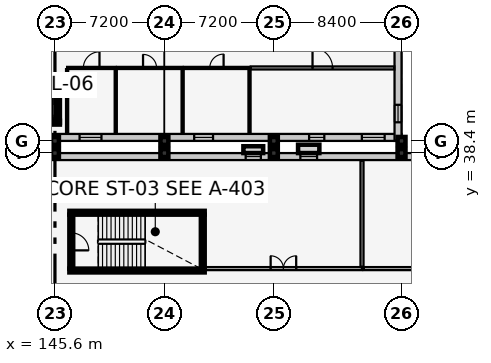
"""IFC4 building model, lengths in metres.
Left out: names, types, materials, properties, quantities, classifications, styles, units other than length and angle.
Written with IfcOpenShell. Run it as: python <this file> out.ifc"""

import sys

from ifc_helpers import new_model, si_unit, direction, frame, frame_2d, origin, origin_2d, place, context, subcontext, project, spatial, rectangle, extrude, element, fill, save


model = new_model("IFC4")
c1 = context("Model", 3, precision=1e-05, world=origin(), true_north=direction((0.0, 1.0)))
c2 = subcontext(c1, "Body", "Model", "MODEL_VIEW")
j1 = project(units=[si_unit("LENGTHUNIT", "METRE"), si_unit("PLANEANGLEUNIT", "RADIAN")], contexts=[c1])
p1 = place(None, origin())
s1 = spatial("IfcSite", under=j1, at=p1, CompositionType="ELEMENT")
p2 = place(p1, origin())
s2 = spatial("IfcBuilding", under=s1, at=p2, CompositionType="ELEMENT")
p3 = place(p2, frame((0.0, 0.0, 5.4)))
s3 = spatial("IfcBuildingStorey", under=s2, at=p3, CompositionType="ELEMENT", Elevation=5.4)
for number, where, z_axis, x_axis in (
    (1, (145.6, 38.4, 0.0), (0.0, 0.0, 1.0), (1.0, 0.0, 0.0)),
    (2, (152.8, 38.4, 0.0), (0.0, 0.0, 1.0), (1.0, 0.0, 0.0)),
    (3, (160.0, 38.4, 0.0), (0.0, 0.0, 1.0), (1.0, 0.0, 0.0)),
    (4, (168.4, 38.4, 0.0), (0.0, 0.0, 1.0), (1.0, 0.0, 0.0)),
    (5, (145.6, 39.2, 0.0), (0.0, 0.0, 1.0), (1.0, 0.0, 0.0)),
    (6, (152.8, 39.2, 0.0), (0.0, 0.0, 1.0), (1.0, 0.0, 0.0)),
    (7, (160.0, 39.2, 0.0), (0.0, 0.0, 1.0), (1.0, 0.0, 0.0)),
    (8, (168.4, 39.2, 0.0), (0.0, 0.0, 1.0), (1.0, 0.0, 0.0)),
):
    element("IfcColumn", number, at=place(p3, frame(where, z_axis=z_axis, x_axis=x_axis)), inside=s3, PredefinedType="COLUMN", context=c2, shape_type="SweptSolid", body=[
        extrude(rectangle(XDim=0.52, YDim=0.52, at=origin_2d()), origin(), (0.0, 0.0, 1.0), 4.2),
    ])
p4 = place(p3, frame((124.0, 38.17, 0.0), z_axis=(0.0, 0.0, 1.0), x_axis=(1.0, 0.0, 0.0)))
e9 = element("IfcWall", 9, at=p4, inside=s3, PredefinedType="SOLIDWALL", context=c2, shape_type="SweptSolid", body=[
    extrude(rectangle(XDim=62.0, YDim=0.46, at=frame_2d((31.0, 0.0))), origin(), (0.0, 0.0, 1.0), 3.095),
])
p5 = place(p4, frame((1.134, 0.0, 0.9)))
e10 = element("IfcOpeningElement", 10, at=p5, cuts=e9, PredefinedType="OPENING", context=c2, shape_type="SweptSolid", body=[
    extrude(rectangle(XDim=1.38, YDim=1.6, at=frame_2d((0.69, 0.8))), frame((0.0, 0.242, 0.0), z_axis=(0.0, -1.0, 0.0), x_axis=(1.0, 0.0, 0.0)), (0.0, 0.0, 1.0), 0.484),
])
p6 = place(p4, frame((4.721, 0.0, 0.9)))
e11 = element("IfcOpeningElement", 11, at=p6, cuts=e9, PredefinedType="OPENING", context=c2, shape_type="SweptSolid", body=[
    extrude(rectangle(XDim=1.5, YDim=1.6, at=frame_2d((0.75, 0.8))), frame((0.0, 0.242, 0.0), z_axis=(0.0, -1.0, 0.0), x_axis=(1.0, 0.0, 0.0)), (0.0, 0.0, 1.0), 0.484),
])
p7 = place(p4, frame((12.205, 0.0, 0.9)))
e12 = element("IfcOpeningElement", 12, at=p7, cuts=e9, PredefinedType="OPENING", context=c2, shape_type="SweptSolid", body=[
    extrude(rectangle(XDim=1.12, YDim=1.75, at=frame_2d((0.56, 0.875))), frame((0.0, 0.242, 0.0), z_axis=(0.0, -1.0, 0.0), x_axis=(1.0, 0.0, 0.0)), (0.0, 0.0, 1.0), 0.484),
])
p8 = place(p4, frame((15.792, 0.0, 0.9)))
e13 = element("IfcOpeningElement", 13, at=p8, cuts=e9, PredefinedType="OPENING", context=c2, shape_type="SweptSolid", body=[
    extrude(rectangle(XDim=1.24, YDim=1.75, at=frame_2d((0.62, 0.875))), frame((0.0, 0.242, 0.0), z_axis=(0.0, -1.0, 0.0), x_axis=(1.0, 0.0, 0.0)), (0.0, 0.0, 1.0), 0.484),
])
p9 = place(p4, frame((19.389, 0.0, 0.9)))
e14 = element("IfcOpeningElement", 14, at=p9, cuts=e9, PredefinedType="OPENING", context=c2, shape_type="SweptSolid", body=[
    extrude(rectangle(XDim=1.34, YDim=1.75, at=frame_2d((0.67, 0.875))), frame((0.0, 0.242, 0.0), z_axis=(0.0, -1.0, 0.0), x_axis=(1.0, 0.0, 0.0)), (0.0, 0.0, 1.0), 0.484),
])
p10 = place(p4, frame((34.147, 0.0, 0.9)))
e15 = element("IfcOpeningElement", 15, at=p10, cuts=e9, PredefinedType="OPENING", context=c2, shape_type="SweptSolid", body=[
    extrude(rectangle(XDim=1.0, YDim=1.35, at=frame_2d((0.5, 0.675))), frame((0.0, 0.242, 0.0), z_axis=(0.0, -1.0, 0.0), x_axis=(1.0, 0.0, 0.0)), (0.0, 0.0, 1.0), 0.484),
])
p11 = place(p4, frame((37.744, 0.0, 0.9)))
e16 = element("IfcOpeningElement", 16, at=p11, cuts=e9, PredefinedType="OPENING", context=c2, shape_type="SweptSolid", body=[
    extrude(rectangle(XDim=1.1, YDim=1.35, at=frame_2d((0.55, 0.675))), frame((0.0, 0.242, 0.0), z_axis=(0.0, -1.0, 0.0), x_axis=(1.0, 0.0, 0.0)), (0.0, 0.0, 1.0), 0.484),
])
p12 = place(p4, frame((48.535, 0.0, 0.9)))
e17 = element("IfcOpeningElement", 17, at=p12, cuts=e9, PredefinedType="OPENING", context=c2, shape_type="SweptSolid", body=[
    extrude(rectangle(XDim=1.4, YDim=1.35, at=frame_2d((0.7, 0.675))), frame((0.0, 0.242, 0.0), z_axis=(0.0, -1.0, 0.0), x_axis=(1.0, 0.0, 0.0)), (0.0, 0.0, 1.0), 0.484),
])
p13 = place(p4, frame((59.602, 0.0, 0.9)))
e18 = element("IfcOpeningElement", 18, at=p13, cuts=e9, PredefinedType="OPENING", context=c2, shape_type="SweptSolid", body=[
    extrude(rectangle(XDim=1.15, YDim=1.45, at=frame_2d((0.575, 0.725))), frame((0.0, 0.242, 0.0), z_axis=(0.0, -1.0, 0.0), x_axis=(1.0, 0.0, 0.0)), (0.0, 0.0, 1.0), 0.484),
])
p14 = place(p3, frame((168.4, 39.43, 0.0), z_axis=(0.0, 0.0, 1.0), x_axis=(-1.0, 0.0, 0.0)))
e19 = element("IfcWall", 19, at=p14, inside=s3, PredefinedType="SOLIDWALL", context=c2, shape_type="SweptSolid", body=[
    extrude(rectangle(XDim=37.2, YDim=0.46, at=frame_2d((18.6, 0.0))), origin(), (0.0, 0.0, 1.0), 3.115),
])
p15 = place(p14, frame((1.11, 0.0, 0.9)))
e20 = element("IfcOpeningElement", 20, at=p15, cuts=e19, PredefinedType="OPENING", context=c2, shape_type="SweptSolid", body=[
    extrude(rectangle(XDim=1.5, YDim=1.6, at=frame_2d((0.75, 0.8))), frame((0.0, 0.242, 0.0), z_axis=(0.0, -1.0, 0.0), x_axis=(1.0, 0.0, 0.0)), (0.0, 0.0, 1.0), 0.484),
])
p16 = place(p14, frame((5.08, 0.0, 0.9)))
e21 = element("IfcOpeningElement", 21, at=p16, cuts=e19, PredefinedType="OPENING", context=c2, shape_type="SweptSolid", body=[
    extrude(rectangle(XDim=1.0, YDim=1.75, at=frame_2d((0.5, 0.875))), frame((0.0, 0.242, 0.0), z_axis=(0.0, -1.0, 0.0), x_axis=(1.0, 0.0, 0.0)), (0.0, 0.0, 1.0), 0.484),
])
p17 = place(p14, frame((12.4, 0.0, 0.9)))
e22 = element("IfcOpeningElement", 22, at=p17, cuts=e19, PredefinedType="OPENING", context=c2, shape_type="SweptSolid", body=[
    extrude(rectangle(XDim=1.24, YDim=1.75, at=frame_2d((0.62, 0.875))), frame((0.0, 0.242, 0.0), z_axis=(0.0, -1.0, 0.0), x_axis=(1.0, 0.0, 0.0)), (0.0, 0.0, 1.0), 0.484),
])
p18 = place(p14, frame((19.74, 0.0, 0.9)))
e23 = element("IfcOpeningElement", 23, at=p18, cuts=e19, PredefinedType="OPENING", context=c2, shape_type="SweptSolid", body=[
    extrude(rectangle(XDim=1.44, YDim=1.75, at=frame_2d((0.72, 0.875))), frame((0.0, 0.242, 0.0), z_axis=(0.0, -1.0, 0.0), x_axis=(1.0, 0.0, 0.0)), (0.0, 0.0, 1.0), 0.484),
])
p19 = place(p14, frame((27.45, 0.0, 0.9)))
e24 = element("IfcOpeningElement", 24, at=p19, cuts=e19, PredefinedType="OPENING", context=c2, shape_type="SweptSolid", body=[
    extrude(rectangle(XDim=0.9, YDim=1.35, at=frame_2d((0.45, 0.675))), frame((0.0, 0.242, 0.0), z_axis=(0.0, -1.0, 0.0), x_axis=(1.0, 0.0, 0.0)), (0.0, 0.0, 1.0), 0.484),
])
p20 = place(p14, frame((31.12, 0.0, 0.9)))
e25 = element("IfcOpeningElement", 25, at=p20, cuts=e19, PredefinedType="OPENING", context=c2, shape_type="SweptSolid", body=[
    extrude(rectangle(XDim=1.0, YDim=1.35, at=frame_2d((0.5, 0.675))), frame((0.0, 0.242, 0.0), z_axis=(0.0, -1.0, 0.0), x_axis=(1.0, 0.0, 0.0)), (0.0, 0.0, 1.0), 0.484),
])
p21 = place(p14, frame((34.79, 0.0, 0.9)))
e26 = element("IfcOpeningElement", 26, at=p21, cuts=e19, PredefinedType="OPENING", context=c2, shape_type="SweptSolid", body=[
    extrude(rectangle(XDim=1.1, YDim=1.35, at=frame_2d((0.55, 0.675))), frame((0.0, 0.242, 0.0), z_axis=(0.0, -1.0, 0.0), x_axis=(1.0, 0.0, 0.0)), (0.0, 0.0, 1.0), 0.484),
])
p22 = place(p3, frame((168.17, 60.8, 0.0), z_axis=(0.0, 0.0, 1.0), x_axis=(0.0, -1.0, 0.0)))
e27 = element("IfcWall", 27, at=p22, inside=s3, PredefinedType="SOLIDWALL", context=c2, shape_type="SweptSolid", body=[
    extrude(rectangle(XDim=21.6, YDim=0.46, at=frame_2d((10.8, 0.0))), origin(), (0.0, 0.0, 1.0), 3.215),
])
p23 = place(p22, frame((1.2, 0.0, 0.9)))
e28 = element("IfcOpeningElement", 28, at=p23, cuts=e27, PredefinedType="OPENING", context=c2, shape_type="SweptSolid", body=[
    extrude(rectangle(XDim=1.2, YDim=1.35, at=frame_2d((0.6, 0.675))), frame((0.0, 0.242, 0.0), z_axis=(0.0, -1.0, 0.0), x_axis=(1.0, 0.0, 0.0)), (0.0, 0.0, 1.0), 0.484),
])
p24 = place(p22, frame((4.75, 0.0, 0.9)))
e29 = element("IfcOpeningElement", 29, at=p24, cuts=e27, PredefinedType="OPENING", context=c2, shape_type="SweptSolid", body=[
    extrude(rectangle(XDim=1.3, YDim=1.35, at=frame_2d((0.65, 0.675))), frame((0.0, 0.242, 0.0), z_axis=(0.0, -1.0, 0.0), x_axis=(1.0, 0.0, 0.0)), (0.0, 0.0, 1.0), 0.484),
])
p25 = place(p22, frame((8.3, 0.0, 0.9)))
e30 = element("IfcOpeningElement", 30, at=p25, cuts=e27, PredefinedType="OPENING", context=c2, shape_type="SweptSolid", body=[
    extrude(rectangle(XDim=1.4, YDim=1.35, at=frame_2d((0.7, 0.675))), frame((0.0, 0.242, 0.0), z_axis=(0.0, -1.0, 0.0), x_axis=(1.0, 0.0, 0.0)), (0.0, 0.0, 1.0), 0.484),
])
p26 = place(p22, frame((12.125, 0.0, 0.9)))
e31 = element("IfcOpeningElement", 31, at=p26, cuts=e27, PredefinedType="OPENING", context=c2, shape_type="SweptSolid", body=[
    extrude(rectangle(XDim=0.95, YDim=1.45, at=frame_2d((0.475, 0.725))), frame((0.0, 0.242, 0.0), z_axis=(0.0, -1.0, 0.0), x_axis=(1.0, 0.0, 0.0)), (0.0, 0.0, 1.0), 0.484),
])
p27 = place(p22, frame((19.225, 0.0, 0.9)))
e32 = element("IfcOpeningElement", 32, at=p27, cuts=e27, PredefinedType="OPENING", context=c2, shape_type="SweptSolid", body=[
    extrude(rectangle(XDim=1.15, YDim=1.45, at=frame_2d((0.575, 0.725))), frame((0.0, 0.242, 0.0), z_axis=(0.0, -1.0, 0.0), x_axis=(1.0, 0.0, 0.0)), (0.0, 0.0, 1.0), 0.484),
])
for number, where, z_axis, x_axis in (
    (33, (146.55, 30.675, 0.0), (0.0, 0.0, 1.0), (1.0, 0.0, 0.0)),
    (34, (155.45, 34.475, 0.0), (0.0, 0.0, 1.0), (-1.0, 0.0, 0.0)),
):
    element("IfcWall", number, at=place(p3, frame(where, z_axis=z_axis, x_axis=x_axis)), inside=s3, PredefinedType="SHEAR", context=c2, shape_type="SweptSolid", body=[
        extrude(rectangle(XDim=8.9, YDim=0.25, at=frame_2d((4.45, 0.0))), origin(), (0.0, 0.0, 1.0), 3.94),
    ])
p28 = place(p3, frame((146.675, 34.35, 0.0), z_axis=(0.0, 0.0, 1.0), x_axis=(0.0, -1.0, 0.0)))
e35 = element("IfcWall", 35, at=p28, inside=s3, PredefinedType="SHEAR", context=c2, shape_type="SweptSolid", body=[
    extrude(rectangle(XDim=3.55, YDim=0.25, at=frame_2d((1.775, 0.0))), origin(), (0.0, 0.0, 1.0), 3.94),
])
p29 = place(p28, frame((1.2, 0.0, 0.0)))
e36 = element("IfcOpeningElement", 36, at=p29, cuts=e35, PredefinedType="OPENING", context=c2, shape_type="SweptSolid", body=[
    extrude(rectangle(XDim=1.15, YDim=2.15, at=frame_2d((0.575, 1.075))), frame((0.0, 0.137, 0.0), z_axis=(0.0, -1.0, 0.0), x_axis=(1.0, 0.0, 0.0)), (0.0, 0.0, 1.0), 0.274),
])
p30 = place(p3, frame((155.325, 30.8, 0.0), z_axis=(0.0, 0.0, 1.0), x_axis=(0.0, 1.0, 0.0)))
e37 = element("IfcWall", 37, at=p30, inside=s3, PredefinedType="SHEAR", context=c2, shape_type="SweptSolid", body=[
    extrude(rectangle(XDim=3.55, YDim=0.25, at=frame_2d((1.775, 0.0))), origin(), (0.0, 0.0, 1.0), 3.94),
])
p31 = place(p3, frame((143.875, 40.4, 0.0), z_axis=(0.0, 0.0, 1.0), x_axis=(1.0, 0.0, 0.0)))
e38 = element("IfcWall", 38, at=p31, inside=s3, PredefinedType="SHEAR", context=c2, shape_type="SweptSolid", body=[
    extrude(rectangle(XDim=2.05, YDim=0.25, at=frame_2d((1.025, 0.0))), origin(), (0.0, 0.0, 1.0), 3.96),
])
p32 = place(p3, frame((145.925, 42.4, 0.0), z_axis=(0.0, 0.0, 1.0), x_axis=(-1.0, 0.0, 0.0)))
e39 = element("IfcWall", 39, at=p32, inside=s3, PredefinedType="SHEAR", context=c2, shape_type="SweptSolid", body=[
    extrude(rectangle(XDim=2.05, YDim=0.25, at=frame_2d((1.025, 0.0))), origin(), (0.0, 0.0, 1.0), 3.96),
])
p33 = place(p32, frame((0.55, 0.0, 0.0)))
e40 = element("IfcOpeningElement", 40, at=p33, cuts=e39, PredefinedType="OPENING", context=c2, shape_type="SweptSolid", body=[
    extrude(rectangle(XDim=0.95, YDim=2.1, at=frame_2d((0.475, 1.05))), frame((0.0, 0.137, 0.0), z_axis=(0.0, -1.0, 0.0), x_axis=(1.0, 0.0, 0.0)), (0.0, 0.0, 1.0), 0.274),
])
p34 = place(p3, frame((145.8, 40.4, 0.0), z_axis=(0.0, 0.0, 1.0), x_axis=(0.0, 1.0, 0.0)))
e41 = element("IfcWall", 41, at=p34, inside=s3, PredefinedType="SHEAR", context=c2, shape_type="SweptSolid", body=[
    extrude(rectangle(XDim=2.0, YDim=0.25, at=frame_2d((1.0, 0.0))), origin(), (0.0, 0.0, 1.0), 3.96),
])
p35 = place(p3, frame((155.46, 30.8, 0.0), z_axis=(0.0, 0.0, 1.0), x_axis=(1.0, 0.0, 0.0)))
e42 = element("IfcWall", 42, at=p35, inside=s3, PredefinedType="PARTITIONING", context=c2, shape_type="SweptSolid", body=[
    extrude(rectangle(XDim=10.34, YDim=0.2, at=frame_2d((5.17, 0.0))), origin(), (0.0, 0.0, 1.0), 3.94),
])
p36 = place(p35, frame((4.33, 0.0, 0.0)))
e43 = element("IfcOpeningElement", 43, at=p36, cuts=e42, PredefinedType="OPENING", context=c2, shape_type="SweptSolid", body=[
    extrude(rectangle(XDim=1.68, YDim=2.3, at=frame_2d((0.84, 1.15))), frame((0.0, 0.112, 0.0), z_axis=(0.0, -1.0, 0.0), x_axis=(1.0, 0.0, 0.0)), (0.0, 0.0, 1.0), 0.224),
])
p37 = place(p3, frame((165.8, 30.91, 0.0), z_axis=(0.0, 0.0, 1.0), x_axis=(0.0, 1.0, 0.0)))
e44 = element("IfcWall", 44, at=p37, inside=s3, PredefinedType="PARTITIONING", context=c2, shape_type="SweptSolid", body=[
    extrude(rectangle(XDim=7.02, YDim=0.2, at=frame_2d((3.51, 0.0))), origin(), (0.0, 0.0, 1.0), 3.94),
])
p38 = place(p3, frame((165.91, 30.8, 0.0), z_axis=(0.0, 0.0, 1.0), x_axis=(1.0, 0.0, 0.0)))
e45 = element("IfcWall", 45, at=p38, inside=s3, PredefinedType="PARTITIONING", context=c2, shape_type="SweptSolid", body=[
    extrude(rectangle(XDim=10.49, YDim=0.2, at=frame_2d((5.245, 0.0))), origin(), (0.0, 0.0, 1.0), 3.94),
])
p39 = place(p38, frame((4.465, 0.0, 0.0)))
e46 = element("IfcOpeningElement", 46, at=p39, cuts=e45, PredefinedType="OPENING", context=c2, shape_type="SweptSolid", body=[
    extrude(rectangle(XDim=1.56, YDim=2.25, at=frame_2d((0.78, 1.125))), frame((0.0, 0.112, 0.0), z_axis=(0.0, -1.0, 0.0), x_axis=(1.0, 0.0, 0.0)), (0.0, 0.0, 1.0), 0.224),
])
p40 = place(p3, frame((146.4, 44.0, 0.0), z_axis=(0.0, 0.0, 1.0), x_axis=(1.0, 0.0, 0.0)))
e47 = element("IfcWall", 47, at=p40, inside=s3, PredefinedType="PARTITIONING", context=c2, shape_type="SweptSolid", body=[
    extrude(rectangle(XDim=3.2, YDim=0.14, at=frame_2d((1.6, 0.0))), origin(), (0.0, 0.0, 1.0), 3.96),
])
p41 = place(p40, frame((1.07, 0.0, 0.0)))
e48 = element("IfcOpeningElement", 48, at=p41, cuts=e47, PredefinedType="OPENING", context=c2, shape_type="SweptSolid", body=[
    extrude(rectangle(XDim=1.06, YDim=2.1, at=frame_2d((0.53, 1.05))), frame((0.0, 0.082, 0.0), z_axis=(0.0, -1.0, 0.0), x_axis=(1.0, 0.0, 0.0)), (0.0, 0.0, 1.0), 0.164),
])
for number, where, z_axis, x_axis in (
    (49, (146.4, 39.67, 0.0), (0.0, 0.0, 1.0), (0.0, 1.0, 0.0)),
    (50, (149.6, 39.67, 0.0), (0.0, 0.0, 1.0), (0.0, 1.0, 0.0)),
):
    element("IfcWall", number, at=place(p3, frame(where, z_axis=z_axis, x_axis=x_axis)), inside=s3, PredefinedType="PARTITIONING", context=c2, shape_type="SweptSolid", body=[
        extrude(rectangle(XDim=4.25, YDim=0.14, at=frame_2d((2.125, 0.0))), origin(), (0.0, 0.0, 1.0), 3.96),
    ])
p42 = place(p3, frame((149.68, 44.0, 0.0), z_axis=(0.0, 0.0, 1.0), x_axis=(1.0, 0.0, 0.0)))
e51 = element("IfcWall", 51, at=p42, inside=s3, PredefinedType="PARTITIONING", context=c2, shape_type="SweptSolid", body=[
    extrude(rectangle(XDim=4.32, YDim=0.14, at=frame_2d((2.16, 0.0))), origin(), (0.0, 0.0, 1.0), 3.96),
])
p43 = place(p42, frame((1.715, 0.0, 0.0)))
e52 = element("IfcOpeningElement", 52, at=p43, cuts=e51, PredefinedType="OPENING", context=c2, shape_type="SweptSolid", body=[
    extrude(rectangle(XDim=0.89, YDim=2.05, at=frame_2d((0.445, 1.025))), frame((0.0, 0.082, 0.0), z_axis=(0.0, -1.0, 0.0), x_axis=(1.0, 0.0, 0.0)), (0.0, 0.0, 1.0), 0.164),
])
p44 = place(p3, frame((154.0, 39.67, 0.0), z_axis=(0.0, 0.0, 1.0), x_axis=(0.0, 1.0, 0.0)))
e53 = element("IfcWall", 53, at=p44, inside=s3, PredefinedType="PARTITIONING", context=c2, shape_type="SweptSolid", body=[
    extrude(rectangle(XDim=4.25, YDim=0.14, at=frame_2d((2.125, 0.0))), origin(), (0.0, 0.0, 1.0), 3.96),
])
p45 = place(p3, frame((154.08, 44.0, 0.0), z_axis=(0.0, 0.0, 1.0), x_axis=(1.0, 0.0, 0.0)))
e54 = element("IfcWall", 54, at=p45, inside=s3, PredefinedType="PARTITIONING", context=c2, shape_type="SweptSolid", body=[
    extrude(rectangle(XDim=4.32, YDim=0.14, at=frame_2d((2.16, 0.0))), origin(), (0.0, 0.0, 1.0), 3.96),
])
p46 = place(p45, frame((1.705, 0.0, 0.0)))
e55 = element("IfcOpeningElement", 55, at=p46, cuts=e54, PredefinedType="OPENING", context=c2, shape_type="SweptSolid", body=[
    extrude(rectangle(XDim=0.91, YDim=2.06, at=frame_2d((0.455, 1.03))), frame((0.0, 0.082, 0.0), z_axis=(0.0, -1.0, 0.0), x_axis=(1.0, 0.0, 0.0)), (0.0, 0.0, 1.0), 0.164),
])
p47 = place(p3, frame((158.4, 39.67, 0.0), z_axis=(0.0, 0.0, 1.0), x_axis=(0.0, 1.0, 0.0)))
e56 = element("IfcWall", 56, at=p47, inside=s3, PredefinedType="PARTITIONING", context=c2, shape_type="SweptSolid", body=[
    extrude(rectangle(XDim=4.25, YDim=0.14, at=frame_2d((2.125, 0.0))), origin(), (0.0, 0.0, 1.0), 3.96),
])
p48 = place(p3, frame((158.48, 44.0, 0.0), z_axis=(0.0, 0.0, 1.0), x_axis=(1.0, 0.0, 0.0)))
e57 = element("IfcWall", 57, at=p48, inside=s3, PredefinedType="PARTITIONING", context=c2, shape_type="SweptSolid", body=[
    extrude(rectangle(XDim=9.45, YDim=0.2, at=frame_2d((4.725, 0.0))), origin(), (0.0, 0.0, 1.0), 3.96),
])
p49 = place(p48, frame((4.065, 0.0, 0.0)))
e58 = element("IfcOpeningElement", 58, at=p49, cuts=e57, PredefinedType="OPENING", context=c2, shape_type="SweptSolid", body=[
    extrude(rectangle(XDim=1.32, YDim=2.15, at=frame_2d((0.66, 1.075))), frame((0.0, 0.112, 0.0), z_axis=(0.0, -1.0, 0.0), x_axis=(1.0, 0.0, 0.0)), (0.0, 0.0, 1.0), 0.224),
])
p50 = place(p10, origin())
e59 = element("IfcWindow", 59, at=p50, inside=s3, PartitioningType="SINGLE_PANEL", PredefinedType="WINDOW", context=c2, shape_type="SweptSolid", body=[
    extrude(rectangle(XDim=1.0, YDim=1.35, at=frame_2d((0.5, 0.675))), frame((0.0, 0.03, 0.0), z_axis=(0.0, -1.0, 0.0), x_axis=(1.0, 0.0, 0.0)), (0.0, 0.0, 1.0), 0.06),
])
fill(e15, e59)
p51 = place(p11, origin())
e60 = element("IfcWindow", 60, at=p51, inside=s3, PartitioningType="SINGLE_PANEL", PredefinedType="WINDOW", context=c2, shape_type="SweptSolid", body=[
    extrude(rectangle(XDim=1.1, YDim=1.35, at=frame_2d((0.55, 0.675))), frame((0.0, 0.03, 0.0), z_axis=(0.0, -1.0, 0.0), x_axis=(1.0, 0.0, 0.0)), (0.0, 0.0, 1.0), 0.06),
])
fill(e16, e60)
p52 = place(p15, origin())
e61 = element("IfcWindow", 61, at=p52, inside=s3, PartitioningType="SINGLE_PANEL", PredefinedType="WINDOW", context=c2, shape_type="SweptSolid", body=[
    extrude(rectangle(XDim=1.5, YDim=1.6, at=frame_2d((0.75, 0.8))), frame((0.0, 0.03, 0.0), z_axis=(0.0, -1.0, 0.0), x_axis=(1.0, 0.0, 0.0)), (0.0, 0.0, 1.0), 0.06),
])
fill(e20, e61)
p53 = place(p16, origin())
e62 = element("IfcWindow", 62, at=p53, inside=s3, PartitioningType="SINGLE_PANEL", PredefinedType="WINDOW", context=c2, shape_type="SweptSolid", body=[
    extrude(rectangle(XDim=1.0, YDim=1.75, at=frame_2d((0.5, 0.875))), frame((0.0, 0.03, 0.0), z_axis=(0.0, -1.0, 0.0), x_axis=(1.0, 0.0, 0.0)), (0.0, 0.0, 1.0), 0.06),
])
fill(e21, e62)
p54 = place(p17, origin())
e63 = element("IfcWindow", 63, at=p54, inside=s3, PartitioningType="SINGLE_PANEL", PredefinedType="WINDOW", context=c2, shape_type="SweptSolid", body=[
    extrude(rectangle(XDim=1.24, YDim=1.75, at=frame_2d((0.62, 0.875))), frame((0.0, 0.03, 0.0), z_axis=(0.0, -1.0, 0.0), x_axis=(1.0, 0.0, 0.0)), (0.0, 0.0, 1.0), 0.06),
])
fill(e22, e63)
p55 = place(p18, origin())
e64 = element("IfcWindow", 64, at=p55, inside=s3, PartitioningType="SINGLE_PANEL", PredefinedType="WINDOW", context=c2, shape_type="SweptSolid", body=[
    extrude(rectangle(XDim=1.44, YDim=1.75, at=frame_2d((0.72, 0.875))), frame((0.0, 0.03, 0.0), z_axis=(0.0, -1.0, 0.0), x_axis=(1.0, 0.0, 0.0)), (0.0, 0.0, 1.0), 0.06),
])
fill(e23, e64)
p56 = place(p27, origin())
e65 = element("IfcWindow", 65, at=p56, inside=s3, PartitioningType="SINGLE_PANEL", PredefinedType="WINDOW", context=c2, shape_type="SweptSolid", body=[
    extrude(rectangle(XDim=1.15, YDim=1.45, at=frame_2d((0.575, 0.725))), frame((0.0, 0.03, 0.0), z_axis=(0.0, -1.0, 0.0), x_axis=(1.0, 0.0, 0.0)), (0.0, 0.0, 1.0), 0.06),
])
fill(e32, e65)
p57 = place(p29, origin())
e66 = element("IfcDoor", 66, at=p57, inside=s3, OperationType="SINGLE_SWING_RIGHT", PredefinedType="DOOR", context=c2, shape_type="SweptSolid", body=[
    extrude(rectangle(XDim=1.15, YDim=2.15, at=frame_2d((0.575, 1.075))), frame((0.0, 0.025, 0.0), z_axis=(0.0, -1.0, 0.0), x_axis=(1.0, 0.0, 0.0)), (0.0, 0.0, 1.0), 0.05),
])
fill(e36, e66)
p58 = place(p36, origin())
e67 = element("IfcDoor", 67, at=p58, inside=s3, OperationType="DOUBLE_DOOR_SINGLE_SWING", PredefinedType="DOOR", context=c2, shape_type="SweptSolid", body=[
    extrude(rectangle(XDim=1.68, YDim=2.3, at=frame_2d((0.84, 1.15))), frame((0.0, 0.025, 0.0), z_axis=(0.0, -1.0, 0.0), x_axis=(1.0, 0.0, 0.0)), (0.0, 0.0, 1.0), 0.05),
])
fill(e43, e67)
p59 = place(p41, origin())
e68 = element("IfcDoor", 68, at=p59, inside=s3, OperationType="SINGLE_SWING_RIGHT", PredefinedType="DOOR", context=c2, shape_type="SweptSolid", body=[
    extrude(rectangle(XDim=1.06, YDim=2.1, at=frame_2d((0.53, 1.05))), frame((0.0, 0.025, 0.0), z_axis=(0.0, -1.0, 0.0), x_axis=(1.0, 0.0, 0.0)), (0.0, 0.0, 1.0), 0.05),
])
fill(e48, e68)
p60 = place(p43, origin())
e69 = element("IfcDoor", 69, at=p60, inside=s3, OperationType="SINGLE_SWING_LEFT", PredefinedType="DOOR", context=c2, shape_type="SweptSolid", body=[
    extrude(rectangle(XDim=0.89, YDim=2.05, at=frame_2d((0.445, 1.025))), frame((0.0, 0.025, 0.0), z_axis=(0.0, -1.0, 0.0), x_axis=(1.0, 0.0, 0.0)), (0.0, 0.0, 1.0), 0.05),
])
fill(e52, e69)
p61 = place(p46, origin())
e70 = element("IfcDoor", 70, at=p61, inside=s3, OperationType="SINGLE_SWING_RIGHT", PredefinedType="DOOR", context=c2, shape_type="SweptSolid", body=[
    extrude(rectangle(XDim=0.91, YDim=2.06, at=frame_2d((0.455, 1.03))), frame((0.0, 0.025, 0.0), z_axis=(0.0, -1.0, 0.0), x_axis=(1.0, 0.0, 0.0)), (0.0, 0.0, 1.0), 0.05),
])
fill(e55, e70)
p62 = place(p49, origin())
e71 = element("IfcDoor", 71, at=p62, inside=s3, OperationType="SINGLE_SWING_LEFT", PredefinedType="DOOR", context=c2, shape_type="SweptSolid", body=[
    extrude(rectangle(XDim=1.32, YDim=2.15, at=frame_2d((0.66, 1.075))), frame((0.0, 0.025, 0.0), z_axis=(0.0, -1.0, 0.0), x_axis=(1.0, 0.0, 0.0)), (0.0, 0.0, 1.0), 0.05),
])
fill(e58, e71)
save(model, sys.argv[1])
